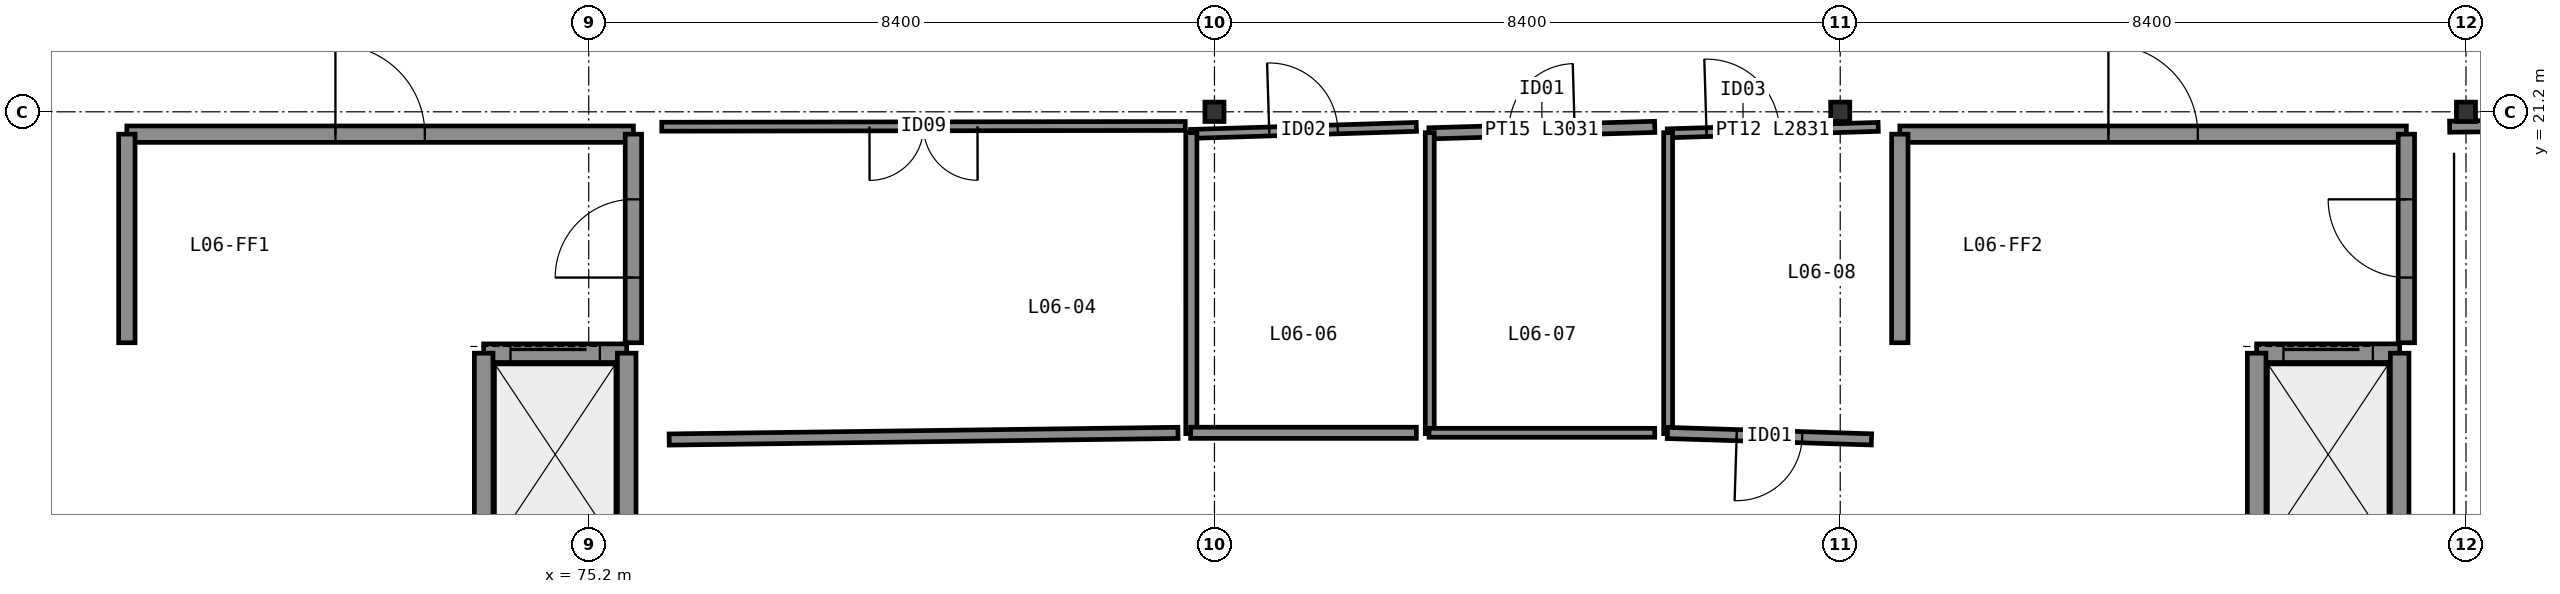
"""IFC4 building model, lengths in metres.
Left out: names, types, materials, properties, quantities, classifications, styles, units other than length and angle.
Written with IfcOpenShell. Run it as: python <this file> out.ifc"""

import sys

from ifc_helpers import new_model, si_unit, direction, frame, frame_2d, origin, origin_2d, place, context, subcontext, project, spatial, rectangle, i_section, extrude, element, fill, save


model = new_model("IFC4")
c1 = context("Model", 3, precision=1e-05, world=origin(), true_north=direction((0.0, 1.0)))
c2 = subcontext(c1, "Body", "Model", "MODEL_VIEW")
j1 = project(units=[si_unit("LENGTHUNIT", "METRE"), si_unit("PLANEANGLEUNIT", "RADIAN")], contexts=[c1])
p1 = place(None, origin())
s1 = spatial("IfcSite", under=j1, at=p1, CompositionType="ELEMENT")
p2 = place(p1, origin())
s2 = spatial("IfcBuilding", under=s1, at=p2, CompositionType="ELEMENT")
p3 = place(p2, frame((0.0, 0.0, 26.4)))
s3 = spatial("IfcBuildingStorey", under=s2, at=p3, CompositionType="ELEMENT", Elevation=26.4)
for number, where, z_axis, x_axis in (
    (1, (83.6, 21.2, 0.0), (0.0, 0.0, 1.0), (1.0, 0.0, 0.0)),
    (2, (92.0, 21.2, 0.0), (0.0, 0.0, 1.0), (1.0, 0.0, 0.0)),
    (3, (100.4, 21.2, 0.0), (0.0, 0.0, 1.0), (1.0, 0.0, 0.0)),
):
    element("IfcColumn", number, at=place(p3, frame(where, z_axis=z_axis, x_axis=x_axis)), inside=s3, PredefinedType="COLUMN", context=c2, shape_type="SweptSolid", body=[
        extrude(i_section(OverallWidth=0.256, OverallDepth=0.26, WebThickness=0.01, FlangeThickness=0.017, FilletRadius=0.013, at=origin_2d()), origin(), (0.0, 0.0, 1.0), 4.8),
    ])
p4 = place(p3, frame((69.0, 20.9, 0.0), z_axis=(0.0, 0.0, 1.0), x_axis=(1.0, 0.0, 0.0)))
e4 = element("IfcWall", 4, at=p4, inside=s3, PredefinedType="SOLIDWALL", context=c2, shape_type="SweptSolid", body=[
    extrude(rectangle(XDim=6.8, YDim=0.22, at=frame_2d((3.4, 0.0))), origin(), (0.0, 0.0, 1.0), 4.48),
])
p5 = place(p4, frame((2.8, 0.0, 0.0)))
e5 = element("IfcOpeningElement", 5, at=p5, cuts=e4, PredefinedType="OPENING", context=c2, shape_type="SweptSolid", body=[
    extrude(rectangle(XDim=1.2, YDim=2.1, at=frame_2d((0.6, 1.05))), frame((0.0, 0.12, 0.0), z_axis=(0.0, -1.0, 0.0), x_axis=(1.0, 0.0, 0.0)), (0.0, 0.0, 1.0), 0.24),
])
p6 = place(p3, frame((69.0, 18.1, 0.0), z_axis=(0.0, 0.0, 1.0), x_axis=(0.0, 1.0, 0.0)))
e6 = element("IfcWall", 6, at=p6, inside=s3, PredefinedType="SOLIDWALL", context=c2, shape_type="SweptSolid", body=[
    extrude(rectangle(XDim=2.8, YDim=0.22, at=frame_2d((1.4, 0.0))), origin(), (0.0, 0.0, 1.0), 4.48),
])
p7 = place(p3, frame((75.8, 18.1, 0.0), z_axis=(0.0, 0.0, 1.0), x_axis=(0.0, 1.0, 0.0)))
e7 = element("IfcWall", 7, at=p7, inside=s3, PredefinedType="SOLIDWALL", context=c2, shape_type="SweptSolid", body=[
    extrude(rectangle(XDim=2.8, YDim=0.22, at=frame_2d((1.4, 0.0))), origin(), (0.0, 0.0, 1.0), 4.48),
])
p8 = place(p7, frame((0.875, 0.0, 0.0)))
e8 = element("IfcOpeningElement", 8, at=p8, cuts=e7, PredefinedType="OPENING", context=c2, shape_type="SweptSolid", body=[
    extrude(rectangle(XDim=1.05, YDim=2.1, at=frame_2d((0.525, 1.05))), frame((0.0, 0.12, 0.0), z_axis=(0.0, -1.0, 0.0), x_axis=(1.0, 0.0, 0.0)), (0.0, 0.0, 1.0), 0.24),
])
p9 = place(p3, frame((73.79, 17.96, 0.0), z_axis=(0.0, 0.0, 1.0), x_axis=(1.0, 0.0, 0.0)))
e9 = element("IfcWall", 9, at=p9, inside=s3, PredefinedType="SHEAR", context=c2, shape_type="SweptSolid", body=[
    extrude(rectangle(XDim=1.92, YDim=0.25, at=frame_2d((0.96, 0.0))), origin(), (0.0, 0.0, 1.0), 4.8),
])
p10 = place(p9, frame((0.36, 0.0, 0.0)))
e10 = element("IfcOpeningElement", 10, at=p10, cuts=e9, PredefinedType="OPENING", context=c2, shape_type="SweptSolid", body=[
    extrude(rectangle(XDim=1.2, YDim=2.2, at=frame_2d((0.6, 1.1))), frame((0.0, 0.135, 0.0), z_axis=(0.0, -1.0, 0.0), x_axis=(1.0, 0.0, 0.0)), (0.0, 0.0, 1.0), 0.27),
])
for number, where, z_axis, x_axis in (
    (11, (73.79, 15.24, 0.0), (0.0, 0.0, 1.0), (0.0, 1.0, 0.0)),
    (12, (75.71, 15.24, 0.0), (0.0, 0.0, 1.0), (0.0, 1.0, 0.0)),
):
    element("IfcWall", number, at=place(p3, frame(where, z_axis=z_axis, x_axis=x_axis)), inside=s3, PredefinedType="SHEAR", context=c2, shape_type="SweptSolid", body=[
        extrude(rectangle(XDim=2.72, YDim=0.25, at=frame_2d((1.36, 0.0))), origin(), (0.0, 0.0, 1.0), 4.8),
    ])
p11 = place(p3, frame((92.8, 20.9, 0.0), z_axis=(0.0, 0.0, 1.0), x_axis=(1.0, 0.0, 0.0)))
e13 = element("IfcWall", 13, at=p11, inside=s3, PredefinedType="SOLIDWALL", context=c2, shape_type="SweptSolid", body=[
    extrude(rectangle(XDim=6.8, YDim=0.22, at=frame_2d((3.4, 0.0))), origin(), (0.0, 0.0, 1.0), 4.48),
])
p12 = place(p11, frame((2.8, 0.0, 0.0)))
e14 = element("IfcOpeningElement", 14, at=p12, cuts=e13, PredefinedType="OPENING", context=c2, shape_type="SweptSolid", body=[
    extrude(rectangle(XDim=1.2, YDim=2.1, at=frame_2d((0.6, 1.05))), frame((0.0, 0.12, 0.0), z_axis=(0.0, -1.0, 0.0), x_axis=(1.0, 0.0, 0.0)), (0.0, 0.0, 1.0), 0.24),
])
p13 = place(p3, frame((92.8, 18.1, 0.0), z_axis=(0.0, 0.0, 1.0), x_axis=(0.0, 1.0, 0.0)))
e15 = element("IfcWall", 15, at=p13, inside=s3, PredefinedType="SOLIDWALL", context=c2, shape_type="SweptSolid", body=[
    extrude(rectangle(XDim=2.8, YDim=0.22, at=frame_2d((1.4, 0.0))), origin(), (0.0, 0.0, 1.0), 4.48),
])
p14 = place(p3, frame((99.6, 18.1, 0.0), z_axis=(0.0, 0.0, 1.0), x_axis=(0.0, 1.0, 0.0)))
e16 = element("IfcWall", 16, at=p14, inside=s3, PredefinedType="SOLIDWALL", context=c2, shape_type="SweptSolid", body=[
    extrude(rectangle(XDim=2.8, YDim=0.22, at=frame_2d((1.4, 0.0))), origin(), (0.0, 0.0, 1.0), 4.48),
])
p15 = place(p14, frame((0.875, 0.0, 0.0)))
e17 = element("IfcOpeningElement", 17, at=p15, cuts=e16, PredefinedType="OPENING", context=c2, shape_type="SweptSolid", body=[
    extrude(rectangle(XDim=1.05, YDim=2.1, at=frame_2d((0.525, 1.05))), frame((0.0, 0.12, 0.0), z_axis=(0.0, -1.0, 0.0), x_axis=(1.0, 0.0, 0.0)), (0.0, 0.0, 1.0), 0.24),
])
p16 = place(p3, frame((97.59, 17.96, 0.0), z_axis=(0.0, 0.0, 1.0), x_axis=(1.0, 0.0, 0.0)))
e18 = element("IfcWall", 18, at=p16, inside=s3, PredefinedType="SHEAR", context=c2, shape_type="SweptSolid", body=[
    extrude(rectangle(XDim=1.92, YDim=0.25, at=frame_2d((0.96, 0.0))), origin(), (0.0, 0.0, 1.0), 4.8),
])
p17 = place(p16, frame((0.36, 0.0, 0.0)))
e19 = element("IfcOpeningElement", 19, at=p17, cuts=e18, PredefinedType="OPENING", context=c2, shape_type="SweptSolid", body=[
    extrude(rectangle(XDim=1.2, YDim=2.2, at=frame_2d((0.6, 1.1))), frame((0.0, 0.135, 0.0), z_axis=(0.0, -1.0, 0.0), x_axis=(1.0, 0.0, 0.0)), (0.0, 0.0, 1.0), 0.27),
])
for number, where, z_axis, x_axis in (
    (20, (97.59, 15.24, 0.0), (0.0, 0.0, 1.0), (0.0, 1.0, 0.0)),
    (21, (99.51, 15.24, 0.0), (0.0, 0.0, 1.0), (0.0, 1.0, 0.0)),
):
    element("IfcWall", number, at=place(p3, frame(where, z_axis=z_axis, x_axis=x_axis)), inside=s3, PredefinedType="SHEAR", context=c2, shape_type="SweptSolid", body=[
        extrude(rectangle(XDim=2.72, YDim=0.25, at=frame_2d((1.36, 0.0))), origin(), (0.0, 0.0, 1.0), 4.8),
    ])
p18 = place(p3, frame((89.68, 20.911, 0.0), z_axis=(0.0, 0.0, 1.0), x_axis=(0.999534031939, 0.030524072404, 0.0)))
e22 = element("IfcWall", 22, at=p18, inside=s3, PredefinedType="PARTITIONING", context=c2, shape_type="SweptSolid", body=[
    extrude(rectangle(XDim=2.831, YDim=0.12, at=frame_2d((1.416, 0.0))), origin(), (0.0, 0.0, 1.0), 4.48),
])
p19 = place(p18, frame((0.526, 0.0, 0.0)))
e23 = element("IfcOpeningElement", 23, at=p19, cuts=e22, PredefinedType="OPENING", context=c2, shape_type="SweptSolid", body=[
    extrude(rectangle(XDim=0.98, YDim=2.08, at=frame_2d((0.49, 1.04))), frame((0.0, 0.07, 0.0), z_axis=(0.0, -1.0, 0.0), x_axis=(1.0, 0.0, 0.0)), (0.0, 0.0, 1.0), 0.14),
])
p20 = place(p3, frame((86.48, 20.911, 0.0), z_axis=(0.0, 0.0, 1.0), x_axis=(0.999588861117, 0.028672438527, 0.0)))
e24 = element("IfcWall", 24, at=p20, inside=s3, PredefinedType="PARTITIONING", context=c2, shape_type="SweptSolid", body=[
    extrude(rectangle(XDim=3.031, YDim=0.15, at=frame_2d((1.516, 0.0))), origin(), (0.0, 0.0, 1.0), 4.48),
])
p21 = place(p20, frame((1.076, 0.0, 0.0)))
e25 = element("IfcOpeningElement", 25, at=p21, cuts=e24, PredefinedType="OPENING", context=c2, shape_type="SweptSolid", body=[
    extrude(rectangle(XDim=0.88, YDim=2.08, at=frame_2d((0.44, 1.04))), frame((0.0, 0.085, 0.0), z_axis=(0.0, -1.0, 0.0), x_axis=(1.0, 0.0, 0.0)), (0.0, 0.0, 1.0), 0.17),
])
p22 = place(p3, frame((83.28, 20.903, 0.0), z_axis=(0.0, 0.0, 1.0), x_axis=(0.999514195179, 0.03116686758, 0.0)))
e26 = element("IfcWall", 26, at=p22, inside=s3, PredefinedType="PARTITIONING", context=c2, shape_type="SweptSolid", body=[
    extrude(rectangle(XDim=3.031, YDim=0.12, at=frame_2d((1.516, 0.0))), origin(), (0.0, 0.0, 1.0), 4.48),
])
p23 = place(p22, frame((1.056, 0.0, 0.0)))
e27 = element("IfcOpeningElement", 27, at=p23, cuts=e26, PredefinedType="OPENING", context=c2, shape_type="SweptSolid", body=[
    extrude(rectangle(XDim=0.92, YDim=2.08, at=frame_2d((0.46, 1.04))), frame((0.0, 0.07, 0.0), z_axis=(0.0, -1.0, 0.0), x_axis=(1.0, 0.0, 0.0)), (0.0, 0.0, 1.0), 0.14),
])
p24 = place(p3, frame((83.208, 21.01, 0.0), z_axis=(0.0, 0.0, 1.0), x_axis=(-0.999998985611, -0.001424351517, 0.0)))
e28 = element("IfcWall", 28, at=p24, inside=s3, PredefinedType="PARTITIONING", context=c2, shape_type="SweptSolid", body=[
    extrude(rectangle(XDim=7.028, YDim=0.12, at=frame_2d((3.514, 0.0))), origin(), (0.0, 0.0, 1.0), 4.227),
])
p25 = place(p24, frame((2.789, 0.0, 0.0)))
e29 = element("IfcOpeningElement", 29, at=p25, cuts=e28, PredefinedType="OPENING", context=c2, shape_type="SweptSolid", body=[
    extrude(rectangle(XDim=1.45, YDim=2.18, at=frame_2d((0.725, 1.09))), frame((0.0, 0.07, 0.0), z_axis=(0.0, -1.0, 0.0), x_axis=(1.0, 0.0, 0.0)), (0.0, 0.0, 1.0), 0.14),
])
p26 = place(p3, frame((108.4, 21.09, 0.0), z_axis=(0.0, 0.0, 1.0), x_axis=(-0.99994123637, -0.010840839733, 0.0)))
e30 = element("IfcWall", 30, at=p26, inside=s3, PredefinedType="PARTITIONING", context=c2, shape_type="SweptSolid", body=[
    extrude(rectangle(XDim=8.22, YDim=0.15, at=frame_2d((4.11, 0.0))), origin(), (0.0, 0.0, 1.0), 4.227),
])
p27 = place(p26, frame((3.185, 0.0, 0.0)))
e31 = element("IfcOpeningElement", 31, at=p27, cuts=e30, PredefinedType="OPENING", context=c2, shape_type="SweptSolid", body=[
    extrude(rectangle(XDim=1.85, YDim=2.22, at=frame_2d((0.925, 1.11))), frame((0.0, 0.085, 0.0), z_axis=(0.0, -1.0, 0.0), x_axis=(1.0, 0.0, 0.0)), (0.0, 0.0, 1.0), 0.17),
])
p28 = place(p3, frame((89.69, 16.88, 0.0), z_axis=(0.0, 0.0, 1.0), x_axis=(0.0, 1.0, 0.0)))
e32 = element("IfcWall", 32, at=p28, inside=s3, PredefinedType="PARTITIONING", context=c2, shape_type="SweptSolid", body=[
    extrude(rectangle(XDim=4.04, YDim=0.12, at=frame_2d((2.02, 0.0))), origin(), (0.0, 0.0, 1.0), 4.48),
])
p29 = place(p3, frame((92.419, 16.802, 0.0), z_axis=(0.0, 0.0, 1.0), x_axis=(-0.999502733309, 0.03153230261, 0.0)))
e33 = element("IfcWall", 33, at=p29, inside=s3, PredefinedType="PARTITIONING", context=c2, shape_type="SweptSolid", body=[
    extrude(rectangle(XDim=2.741, YDim=0.15, at=frame_2d((1.371, 0.0))), origin(), (0.0, 0.0, 1.0), 4.48),
])
p30 = place(p29, frame((0.93, 0.0, 0.0)))
e34 = element("IfcOpeningElement", 34, at=p30, cuts=e33, PredefinedType="OPENING", context=c2, shape_type="SweptSolid", body=[
    extrude(rectangle(XDim=0.88, YDim=2.08, at=frame_2d((0.44, 1.04))), frame((0.0, 0.085, 0.0), z_axis=(0.0, -1.0, 0.0), x_axis=(1.0, 0.0, 0.0)), (0.0, 0.0, 1.0), 0.17),
])
p31 = place(p3, frame((86.49, 16.88, 0.0), z_axis=(0.0, 0.0, 1.0), x_axis=(0.0, 1.0, 0.0)))
e35 = element("IfcWall", 35, at=p31, inside=s3, PredefinedType="PARTITIONING", context=c2, shape_type="SweptSolid", body=[
    extrude(rectangle(XDim=4.04, YDim=0.12, at=frame_2d((2.02, 0.0))), origin(), (0.0, 0.0, 1.0), 4.48),
])
p32 = place(p3, frame((89.51, 16.891, 0.0), z_axis=(0.0, 0.0, 1.0), x_axis=(-1.0, 0.0, 0.0)))
e36 = element("IfcWall", 36, at=p32, inside=s3, PredefinedType="PARTITIONING", context=c2, shape_type="SweptSolid", body=[
    extrude(rectangle(XDim=3.03, YDim=0.12, at=frame_2d((1.515, 0.0))), origin(), (0.0, 0.0, 1.0), 4.48),
])
p33 = place(p3, frame((83.29, 16.88, 0.0), z_axis=(0.0, 0.0, 1.0), x_axis=(-0.000120860526, 0.999999992696, 0.0)))
e37 = element("IfcWall", 37, at=p33, inside=s3, PredefinedType="PARTITIONING", context=c2, shape_type="SweptSolid", body=[
    extrude(rectangle(XDim=4.04, YDim=0.15, at=frame_2d((2.02, 0.0))), origin(), (0.0, 0.0, 1.0), 4.48),
])
p34 = place(p3, frame((86.31, 16.891, 0.0), z_axis=(0.0, 0.0, 1.0), x_axis=(-1.0, 0.0, 0.0)))
e38 = element("IfcWall", 38, at=p34, inside=s3, PredefinedType="PARTITIONING", context=c2, shape_type="SweptSolid", body=[
    extrude(rectangle(XDim=3.03, YDim=0.15, at=frame_2d((1.515, 0.0))), origin(), (0.0, 0.0, 1.0), 4.48),
])
p35 = place(p3, frame((83.11, 16.89, 0.0), z_axis=(0.0, 0.0, 1.0), x_axis=(-0.999914900099, -0.013045787051, 0.0)))
e39 = element("IfcWall", 39, at=p35, inside=s3, PredefinedType="PARTITIONING", context=c2, shape_type="SweptSolid", body=[
    extrude(rectangle(XDim=6.831, YDim=0.15, at=frame_2d((3.415, 0.0))), origin(), (0.0, 0.0, 1.0), 4.48),
])
p36 = place(p5, origin())
e40 = element("IfcDoor", 40, at=p36, inside=s3, OperationType="SINGLE_SWING_LEFT", PredefinedType="DOOR", context=c2, shape_type="SweptSolid", body=[
    extrude(rectangle(XDim=1.2, YDim=2.1, at=frame_2d((0.6, 1.05))), frame((0.0, 0.025, 0.0), z_axis=(0.0, -1.0, 0.0), x_axis=(1.0, 0.0, 0.0)), (0.0, 0.0, 1.0), 0.05),
])
fill(e5, e40)
p37 = place(p8, origin())
e41 = element("IfcDoor", 41, at=p37, inside=s3, OperationType="SINGLE_SWING_LEFT", PredefinedType="DOOR", context=c2, shape_type="SweptSolid", body=[
    extrude(rectangle(XDim=1.05, YDim=2.1, at=frame_2d((0.525, 1.05))), frame((0.0, 0.025, 0.0), z_axis=(0.0, -1.0, 0.0), x_axis=(1.0, 0.0, 0.0)), (0.0, 0.0, 1.0), 0.05),
])
fill(e8, e41)
p38 = place(p10, origin())
e42 = element("IfcDoor", 42, at=p38, inside=s3, OperationType="SLIDING_TO_LEFT", PredefinedType="DOOR", context=c2, shape_type="SweptSolid", body=[
    extrude(rectangle(XDim=1.2, YDim=2.2, at=frame_2d((0.6, 1.1))), frame((0.0, 0.025, 0.0), z_axis=(0.0, -1.0, 0.0), x_axis=(1.0, 0.0, 0.0)), (0.0, 0.0, 1.0), 0.05),
])
fill(e10, e42)
p39 = place(p12, origin())
e43 = element("IfcDoor", 43, at=p39, inside=s3, OperationType="SINGLE_SWING_LEFT", PredefinedType="DOOR", context=c2, shape_type="SweptSolid", body=[
    extrude(rectangle(XDim=1.2, YDim=2.1, at=frame_2d((0.6, 1.05))), frame((0.0, 0.025, 0.0), z_axis=(0.0, -1.0, 0.0), x_axis=(1.0, 0.0, 0.0)), (0.0, 0.0, 1.0), 0.05),
])
fill(e14, e43)
p40 = place(p15, origin())
e44 = element("IfcDoor", 44, at=p40, inside=s3, OperationType="SINGLE_SWING_RIGHT", PredefinedType="DOOR", context=c2, shape_type="SweptSolid", body=[
    extrude(rectangle(XDim=1.05, YDim=2.1, at=frame_2d((0.525, 1.05))), frame((0.0, 0.025, 0.0), z_axis=(0.0, -1.0, 0.0), x_axis=(1.0, 0.0, 0.0)), (0.0, 0.0, 1.0), 0.05),
])
fill(e17, e44)
p41 = place(p17, origin())
e45 = element("IfcDoor", 45, at=p41, inside=s3, OperationType="SLIDING_TO_LEFT", PredefinedType="DOOR", context=c2, shape_type="SweptSolid", body=[
    extrude(rectangle(XDim=1.2, YDim=2.2, at=frame_2d((0.6, 1.1))), frame((0.0, 0.025, 0.0), z_axis=(0.0, -1.0, 0.0), x_axis=(1.0, 0.0, 0.0)), (0.0, 0.0, 1.0), 0.05),
])
fill(e19, e45)
p42 = place(p19, origin())
e46 = element("IfcDoor", 46, at=p42, inside=s3, OperationType="SINGLE_SWING_LEFT", PredefinedType="DOOR", context=c2, shape_type="SweptSolid", body=[
    extrude(rectangle(XDim=0.98, YDim=2.08, at=frame_2d((0.49, 1.04))), frame((0.0, 0.025, 0.0), z_axis=(0.0, -1.0, 0.0), x_axis=(1.0, 0.0, 0.0)), (0.0, 0.0, 1.0), 0.05),
])
fill(e23, e46)
p43 = place(p21, origin())
e47 = element("IfcDoor", 47, at=p43, inside=s3, OperationType="SINGLE_SWING_RIGHT", PredefinedType="DOOR", context=c2, shape_type="SweptSolid", body=[
    extrude(rectangle(XDim=0.88, YDim=2.08, at=frame_2d((0.44, 1.04))), frame((0.0, 0.025, 0.0), z_axis=(0.0, -1.0, 0.0), x_axis=(1.0, 0.0, 0.0)), (0.0, 0.0, 1.0), 0.05),
])
fill(e25, e47)
p44 = place(p23, origin())
e48 = element("IfcDoor", 48, at=p44, inside=s3, OperationType="SINGLE_SWING_LEFT", PredefinedType="DOOR", context=c2, shape_type="SweptSolid", body=[
    extrude(rectangle(XDim=0.92, YDim=2.08, at=frame_2d((0.46, 1.04))), frame((0.0, 0.025, 0.0), z_axis=(0.0, -1.0, 0.0), x_axis=(1.0, 0.0, 0.0)), (0.0, 0.0, 1.0), 0.05),
])
fill(e27, e48)
p45 = place(p25, origin())
e49 = element("IfcDoor", 49, at=p45, inside=s3, OperationType="DOUBLE_DOOR_SINGLE_SWING", PredefinedType="DOOR", context=c2, shape_type="SweptSolid", body=[
    extrude(rectangle(XDim=1.45, YDim=2.18, at=frame_2d((0.725, 1.09))), frame((0.0, 0.025, 0.0), z_axis=(0.0, -1.0, 0.0), x_axis=(1.0, 0.0, 0.0)), (0.0, 0.0, 1.0), 0.05),
])
fill(e29, e49)
p46 = place(p30, origin())
e50 = element("IfcDoor", 50, at=p46, inside=s3, OperationType="SINGLE_SWING_RIGHT", PredefinedType="DOOR", context=c2, shape_type="SweptSolid", body=[
    extrude(rectangle(XDim=0.88, YDim=2.08, at=frame_2d((0.44, 1.04))), frame((0.0, 0.025, 0.0), z_axis=(0.0, -1.0, 0.0), x_axis=(1.0, 0.0, 0.0)), (0.0, 0.0, 1.0), 0.05),
])
fill(e34, e50)
save(model, sys.argv[1])
